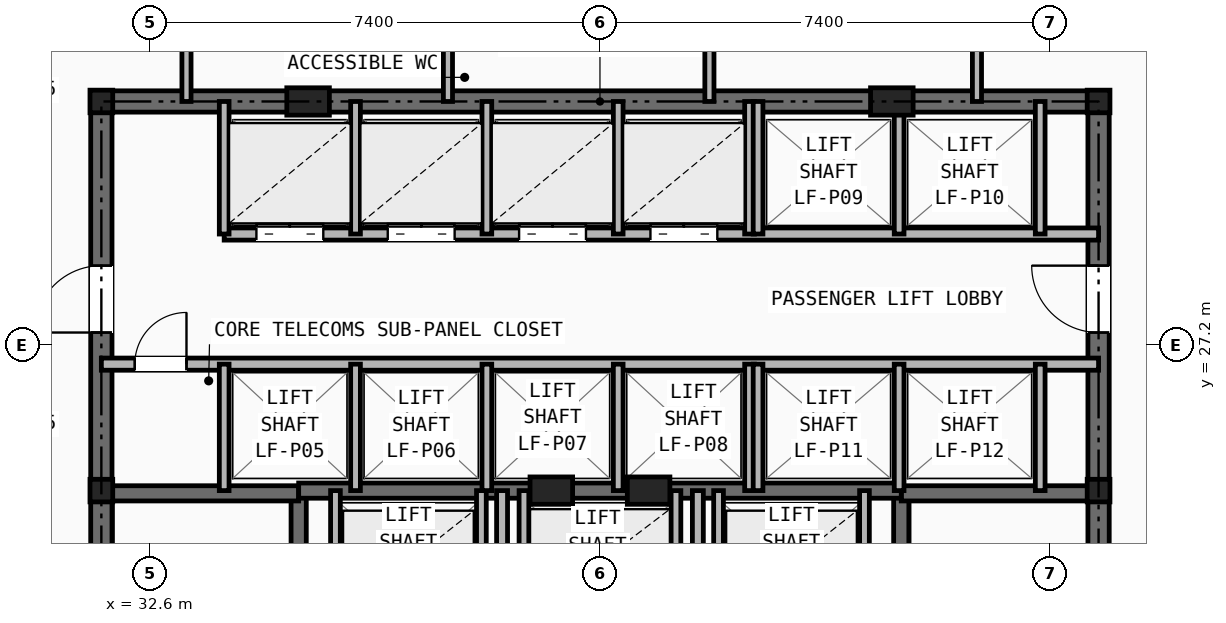
"""IFC4 building model, lengths in metres.
Left out: names, types, materials, properties, quantities, classifications, styles, units other than length and angle.
Written with IfcOpenShell. Run it as: python <this file> out.ifc"""

import sys

from ifc_helpers import new_model, si_unit, direction, frame, frame_2d, origin, origin_2d, place, context, subcontext, project, spatial, rectangle, i_section, extrude, element, fill, save


model = new_model("IFC4")
c1 = context("Model", 3, precision=1e-05, world=origin(), true_north=direction((0.0, 1.0)))
c2 = subcontext(c1, "Body", "Model", "MODEL_VIEW")
j1 = project(units=[si_unit("LENGTHUNIT", "METRE"), si_unit("PLANEANGLEUNIT", "RADIAN")], contexts=[c1])
p1 = place(None, origin())
s1 = spatial("IfcSite", under=j1, at=p1, CompositionType="ELEMENT")
p2 = place(p1, origin())
s2 = spatial("IfcBuilding", under=s1, at=p2, CompositionType="ELEMENT")
p3 = place(p2, frame((0.0, 0.0, 79.8)))
s3 = spatial("IfcBuildingStorey", under=s2, at=p3, CompositionType="ELEMENT", Elevation=79.8)
for number, where, z_axis, x_axis in (
    (1, (31.8, 24.8, 0.0), (0.0, 0.0, 1.0), (1.0, 0.0, 0.0)),
    (2, (48.2, 24.8, 0.0), (0.0, 0.0, 1.0), (1.0, 0.0, 0.0)),
    (3, (31.8, 31.2, 0.0), (0.0, 0.0, 1.0), (1.0, 0.0, 0.0)),
    (4, (48.2, 31.2, 0.0), (0.0, 0.0, 1.0), (1.0, 0.0, 0.0)),
):
    element("IfcColumn", number, at=place(p3, frame(where, z_axis=z_axis, x_axis=x_axis)), inside=s3, PredefinedType="COLUMN", context=c2, shape_type="SweptSolid", body=[
        extrude(i_section(OverallWidth=0.374, OverallDepth=0.372, WebThickness=0.016, FlangeThickness=0.026, at=origin_2d()), origin(), (0.0, 0.0, 1.0), 3.2),
    ])
for number, where, z_axis, x_axis in (
    (5, (35.2, 31.2, 0.0), (0.0, 0.0, 1.0), (1.0, 0.0, 0.0)),
    (6, (44.8, 31.2, 0.0), (0.0, 0.0, 1.0), (1.0, 0.0, 0.0)),
    (7, (39.2, 24.8, 0.0), (0.0, 0.0, 1.0), (1.0, 0.0, 0.0)),
    (8, (40.8, 24.8, 0.0), (0.0, 0.0, 1.0), (1.0, 0.0, 0.0)),
):
    element("IfcColumn", number, at=place(p3, frame(where, z_axis=z_axis, x_axis=x_axis)), inside=s3, PredefinedType="PILASTER", context=c2, shape_type="SweptSolid", body=[
        extrude(rectangle(XDim=0.7, YDim=0.45, at=origin_2d()), origin(), (0.0, 0.0, 1.0), 3.2),
    ])
p4 = place(p3, frame((31.8, 31.2, 0.0), z_axis=(0.0, 0.0, 1.0), x_axis=(1.0, 0.0, 0.0)))
e9 = element("IfcWall", 9, at=p4, inside=s3, PredefinedType="SHEAR", context=c2, shape_type="SweptSolid", body=[
    extrude(rectangle(XDim=16.4, YDim=0.35, at=frame_2d((8.2, 0.0))), origin(), (0.0, 0.0, 1.0), 2.97),
])
p5 = place(p3, frame((31.8, 16.4, 0.0), z_axis=(0.0, 0.0, 1.0), x_axis=(0.0, 1.0, 0.0)))
e10 = element("IfcWall", 10, at=p5, inside=s3, PredefinedType="SHEAR", context=c2, shape_type="SweptSolid", body=[
    extrude(rectangle(XDim=14.8, YDim=0.35, at=frame_2d((7.4, 0.0))), origin(), (0.0, 0.0, 1.0), 2.97),
])
p6 = place(p5, frame((11.0, 0.0, 0.0)))
e11 = element("IfcOpeningElement", 11, at=p6, cuts=e10, PredefinedType="OPENING", context=c2, shape_type="SweptSolid", body=[
    extrude(rectangle(XDim=1.1, YDim=2.15, at=frame_2d((0.55, 1.075))), frame((0.0, 0.185, 0.0), z_axis=(0.0, -1.0, 0.0), x_axis=(1.0, 0.0, 0.0)), (0.0, 0.0, 1.0), 0.37),
])
p7 = place(p3, frame((48.2, 16.4, 0.0), z_axis=(0.0, 0.0, 1.0), x_axis=(0.0, 1.0, 0.0)))
e12 = element("IfcWall", 12, at=p7, inside=s3, PredefinedType="SHEAR", context=c2, shape_type="SweptSolid", body=[
    extrude(rectangle(XDim=14.8, YDim=0.35, at=frame_2d((7.4, 0.0))), origin(), (0.0, 0.0, 1.0), 2.97),
])
p8 = place(p7, frame((11.0, 0.0, 0.0)))
e13 = element("IfcOpeningElement", 13, at=p8, cuts=e12, PredefinedType="OPENING", context=c2, shape_type="SweptSolid", body=[
    extrude(rectangle(XDim=1.1, YDim=2.15, at=frame_2d((0.55, 1.075))), frame((0.0, 0.185, 0.0), z_axis=(0.0, -1.0, 0.0), x_axis=(1.0, 0.0, 0.0)), (0.0, 0.0, 1.0), 0.37),
])
p9 = place(p3, frame((35.045, 16.4, 0.0), z_axis=(0.0, 0.0, 1.0), x_axis=(0.0, 1.0, 0.0)))
e14 = element("IfcWall", 14, at=p9, inside=s3, PredefinedType="SHEAR", context=c2, shape_type="SweptSolid", body=[
    extrude(rectangle(XDim=8.4, YDim=0.25, at=frame_2d((4.2, 0.0))), origin(), (0.0, 0.0, 1.0), 2.97),
])
p10 = place(p9, frame((0.45, 0.0, 0.0)))
e15 = element("IfcOpeningElement", 15, at=p10, cuts=e14, PredefinedType="OPENING", context=c2, shape_type="SweptSolid", body=[
    extrude(rectangle(XDim=0.95, YDim=2.1, at=frame_2d((0.475, 1.05))), frame((0.0, 0.135, 0.0), z_axis=(0.0, -1.0, 0.0), x_axis=(1.0, 0.0, 0.0)), (0.0, 0.0, 1.0), 0.27),
])
p11 = place(p3, frame((31.8, 24.755, 0.0), z_axis=(0.0, 0.0, 1.0), x_axis=(1.0, 0.0, 0.0)))
e16 = element("IfcWall", 16, at=p11, inside=s3, PredefinedType="SHEAR", context=c2, shape_type="SweptSolid", body=[
    extrude(rectangle(XDim=3.245, YDim=0.25, at=frame_2d((1.623, 0.0))), origin(), (0.0, 0.0, 1.0), 2.97),
])
p12 = place(p3, frame((44.955, 16.4, 0.0), z_axis=(0.0, 0.0, 1.0), x_axis=(0.0, 1.0, 0.0)))
e17 = element("IfcWall", 17, at=p12, inside=s3, PredefinedType="SHEAR", context=c2, shape_type="SweptSolid", body=[
    extrude(rectangle(XDim=8.4, YDim=0.25, at=frame_2d((4.2, 0.0))), origin(), (0.0, 0.0, 1.0), 2.97),
])
p13 = place(p12, frame((0.45, 0.0, 0.0)))
e18 = element("IfcOpeningElement", 18, at=p13, cuts=e17, PredefinedType="OPENING", context=c2, shape_type="SweptSolid", body=[
    extrude(rectangle(XDim=0.95, YDim=2.1, at=frame_2d((0.475, 1.05))), frame((0.0, 0.135, 0.0), z_axis=(0.0, -1.0, 0.0), x_axis=(1.0, 0.0, 0.0)), (0.0, 0.0, 1.0), 0.27),
])
p14 = place(p3, frame((44.955, 24.755, 0.0), z_axis=(0.0, 0.0, 1.0), x_axis=(1.0, 0.0, 0.0)))
e19 = element("IfcWall", 19, at=p14, inside=s3, PredefinedType="SHEAR", context=c2, shape_type="SweptSolid", body=[
    extrude(rectangle(XDim=3.245, YDim=0.25, at=frame_2d((1.623, 0.0))), origin(), (0.0, 0.0, 1.0), 2.97),
])
p15 = place(p3, frame((35.045, 24.8, 0.0), z_axis=(0.0, 0.0, 1.0), x_axis=(1.0, 0.0, 0.0)))
e20 = element("IfcWall", 20, at=p15, inside=s3, PredefinedType="SHEAR", context=c2, shape_type="SweptSolid", body=[
    extrude(rectangle(XDim=9.91, YDim=0.25, at=frame_2d((4.955, 0.0))), origin(), (0.0, 0.0, 1.0), 2.97),
])
p16 = place(p3, frame((38.39, 16.4, 0.0), z_axis=(0.0, 0.0, 1.0), x_axis=(0.0, 1.0, 0.0)))
e21 = element("IfcWall", 21, at=p16, inside=s3, PredefinedType="PARTITIONING", context=c2, shape_type="SweptSolid", body=[
    extrude(rectangle(XDim=8.4, YDim=0.18, at=frame_2d((4.2, 0.0))), origin(), (0.0, 0.0, 1.0), 2.421),
])
p17 = place(p16, frame((3.85, 0.0, 0.0)))
e22 = element("IfcOpeningElement", 22, at=p17, cuts=e21, PredefinedType="OPENING", context=c2, shape_type="SweptSolid", body=[
    extrude(rectangle(XDim=0.95, YDim=2.1, at=frame_2d((0.475, 1.05))), frame((0.0, 0.1, 0.0), z_axis=(0.0, -1.0, 0.0), x_axis=(1.0, 0.0, 0.0)), (0.0, 0.0, 1.0), 0.2),
])
p18 = place(p3, frame((41.61, 16.4, 0.0), z_axis=(0.0, 0.0, 1.0), x_axis=(0.0, 1.0, 0.0)))
e23 = element("IfcWall", 23, at=p18, inside=s3, PredefinedType="PARTITIONING", context=c2, shape_type="SweptSolid", body=[
    extrude(rectangle(XDim=8.4, YDim=0.18, at=frame_2d((4.2, 0.0))), origin(), (0.0, 0.0, 1.0), 2.421),
])
for number, where, z_axis, x_axis in (
    (24, (35.65, 22.48, 0.0), (0.0, 0.0, 1.0), (0.0, 1.0, 0.0)),
    (25, (38.05, 22.48, 0.0), (0.0, 0.0, 1.0), (0.0, 1.0, 0.0)),
    (26, (41.95, 22.48, 0.0), (0.0, 0.0, 1.0), (0.0, 1.0, 0.0)),
    (27, (44.35, 22.48, 0.0), (0.0, 0.0, 1.0), (0.0, 1.0, 0.0)),
    (28, (38.75, 22.48, 0.0), (0.0, 0.0, 1.0), (0.0, 1.0, 0.0)),
    (29, (41.25, 22.48, 0.0), (0.0, 0.0, 1.0), (0.0, 1.0, 0.0)),
):
    element("IfcWall", number, at=place(p3, frame(where, z_axis=z_axis, x_axis=x_axis)), inside=s3, PredefinedType="SOLIDWALL", context=c2, shape_type="SweptSolid", body=[
        extrude(rectangle(XDim=2.32, YDim=0.16, at=frame_2d((1.16, 0.0))), origin(), (0.0, 0.0, 1.0), 2.97),
    ])
p19 = place(p3, frame((33.82, 29.02, 0.0), z_axis=(0.0, 0.0, 1.0), x_axis=(1.0, 0.0, 0.0)))
e30 = element("IfcWall", 30, at=p19, inside=s3, PredefinedType="SOLIDWALL", context=c2, shape_type="SweptSolid", body=[
    extrude(rectangle(XDim=14.38, YDim=0.2, at=frame_2d((7.19, 0.0))), origin(), (0.0, 0.0, 1.0), 2.421),
])
p20 = place(p19, frame((0.53, 0.0, 0.0)))
e31 = element("IfcOpeningElement", 31, at=p20, cuts=e30, PredefinedType="OPENING", context=c2, shape_type="SweptSolid", body=[
    extrude(rectangle(XDim=1.1, YDim=2.15, at=frame_2d((0.55, 1.075))), frame((0.0, 0.11, 0.0), z_axis=(0.0, -1.0, 0.0), x_axis=(1.0, 0.0, 0.0)), (0.0, 0.0, 1.0), 0.22),
])
p21 = place(p19, frame((2.69, 0.0, 0.0)))
e32 = element("IfcOpeningElement", 32, at=p21, cuts=e30, PredefinedType="OPENING", context=c2, shape_type="SweptSolid", body=[
    extrude(rectangle(XDim=1.1, YDim=2.15, at=frame_2d((0.55, 1.075))), frame((0.0, 0.11, 0.0), z_axis=(0.0, -1.0, 0.0), x_axis=(1.0, 0.0, 0.0)), (0.0, 0.0, 1.0), 0.22),
])
p22 = place(p19, frame((4.85, 0.0, 0.0)))
e33 = element("IfcOpeningElement", 33, at=p22, cuts=e30, PredefinedType="OPENING", context=c2, shape_type="SweptSolid", body=[
    extrude(rectangle(XDim=1.1, YDim=2.15, at=frame_2d((0.55, 1.075))), frame((0.0, 0.11, 0.0), z_axis=(0.0, -1.0, 0.0), x_axis=(1.0, 0.0, 0.0)), (0.0, 0.0, 1.0), 0.22),
])
p23 = place(p19, frame((7.01, 0.0, 0.0)))
e34 = element("IfcOpeningElement", 34, at=p23, cuts=e30, PredefinedType="OPENING", context=c2, shape_type="SweptSolid", body=[
    extrude(rectangle(XDim=1.1, YDim=2.15, at=frame_2d((0.55, 1.075))), frame((0.0, 0.11, 0.0), z_axis=(0.0, -1.0, 0.0), x_axis=(1.0, 0.0, 0.0)), (0.0, 0.0, 1.0), 0.22),
])
p24 = place(p3, frame((31.8, 26.88, 0.0), z_axis=(0.0, 0.0, 1.0), x_axis=(1.0, 0.0, 0.0)))
e35 = element("IfcWall", 35, at=p24, inside=s3, PredefinedType="SOLIDWALL", context=c2, shape_type="SweptSolid", body=[
    extrude(rectangle(XDim=16.4, YDim=0.2, at=frame_2d((8.2, 0.0))), origin(), (0.0, 0.0, 1.0), 2.421),
])
p25 = place(p24, frame((0.55, 0.0, 0.0)))
e36 = element("IfcOpeningElement", 36, at=p25, cuts=e35, PredefinedType="OPENING", context=c2, shape_type="SweptSolid", body=[
    extrude(rectangle(XDim=0.85, YDim=2.05, at=frame_2d((0.425, 1.025))), frame((0.0, 0.11, 0.0), z_axis=(0.0, -1.0, 0.0), x_axis=(1.0, 0.0, 0.0)), (0.0, 0.0, 1.0), 0.22),
])
p26 = place(p3, frame((33.82, 29.02, 0.0), z_axis=(0.0, 0.0, 1.0), x_axis=(0.0, 1.0, 0.0)))
e37 = element("IfcWall", 37, at=p26, inside=s3, PredefinedType="SOLIDWALL", context=c2, shape_type="SweptSolid", body=[
    extrude(rectangle(XDim=2.18, YDim=0.16, at=frame_2d((1.09, 0.0))), origin(), (0.0, 0.0, 1.0), 2.421),
])
p27 = place(p3, frame((33.82, 24.8, 0.0), z_axis=(0.0, 0.0, 1.0), x_axis=(0.0, 1.0, 0.0)))
e38 = element("IfcWall", 38, at=p27, inside=s3, PredefinedType="SOLIDWALL", context=c2, shape_type="SweptSolid", body=[
    extrude(rectangle(XDim=2.08, YDim=0.16, at=frame_2d((1.04, 0.0))), origin(), (0.0, 0.0, 1.0), 2.97),
])
for number, where, z_axis, x_axis in (
    (39, (35.98, 29.02, 0.0), (0.0, 0.0, 1.0), (0.0, 1.0, 0.0)),
    (40, (38.14, 29.02, 0.0), (0.0, 0.0, 1.0), (0.0, 1.0, 0.0)),
    (41, (40.3, 29.02, 0.0), (0.0, 0.0, 1.0), (0.0, 1.0, 0.0)),
    (42, (42.46, 29.02, 0.0), (0.0, 0.0, 1.0), (0.0, 1.0, 0.0)),
):
    element("IfcWall", number, at=place(p3, frame(where, z_axis=z_axis, x_axis=x_axis)), inside=s3, PredefinedType="SOLIDWALL", context=c2, shape_type="SweptSolid", body=[
        extrude(rectangle(XDim=2.18, YDim=0.16, at=frame_2d((1.09, 0.0))), origin(), (0.0, 0.0, 1.0), 2.421),
    ])
for number, where, z_axis, x_axis in (
    (43, (35.98, 24.8, 0.0), (0.0, 0.0, 1.0), (0.0, 1.0, 0.0)),
    (44, (38.14, 24.8, 0.0), (0.0, 0.0, 1.0), (0.0, 1.0, 0.0)),
    (45, (40.3, 24.8, 0.0), (0.0, 0.0, 1.0), (0.0, 1.0, 0.0)),
    (46, (42.46, 24.8, 0.0), (0.0, 0.0, 1.0), (0.0, 1.0, 0.0)),
):
    element("IfcWall", number, at=place(p3, frame(where, z_axis=z_axis, x_axis=x_axis)), inside=s3, PredefinedType="SOLIDWALL", context=c2, shape_type="SweptSolid", body=[
        extrude(rectangle(XDim=2.08, YDim=0.16, at=frame_2d((1.04, 0.0))), origin(), (0.0, 0.0, 1.0), 2.97),
    ])
for number, where, z_axis, x_axis in (
    (47, (42.6, 29.02, 0.0), (0.0, 0.0, 1.0), (0.0, 1.0, 0.0)),
    (48, (44.92, 29.02, 0.0), (0.0, 0.0, 1.0), (0.0, 1.0, 0.0)),
    (49, (47.24, 29.02, 0.0), (0.0, 0.0, 1.0), (0.0, 1.0, 0.0)),
):
    element("IfcWall", number, at=place(p3, frame(where, z_axis=z_axis, x_axis=x_axis)), inside=s3, PredefinedType="SOLIDWALL", context=c2, shape_type="SweptSolid", body=[
        extrude(rectangle(XDim=2.18, YDim=0.16, at=frame_2d((1.09, 0.0))), origin(), (0.0, 0.0, 1.0), 2.421),
    ])
for number, where, z_axis, x_axis in (
    (50, (42.6, 24.8, 0.0), (0.0, 0.0, 1.0), (0.0, 1.0, 0.0)),
    (51, (44.92, 24.8, 0.0), (0.0, 0.0, 1.0), (0.0, 1.0, 0.0)),
    (52, (47.24, 24.8, 0.0), (0.0, 0.0, 1.0), (0.0, 1.0, 0.0)),
):
    element("IfcWall", number, at=place(p3, frame(where, z_axis=z_axis, x_axis=x_axis)), inside=s3, PredefinedType="SOLIDWALL", context=c2, shape_type="SweptSolid", body=[
        extrude(rectangle(XDim=2.08, YDim=0.16, at=frame_2d((1.04, 0.0))), origin(), (0.0, 0.0, 1.0), 2.97),
    ])
for number, where, z_axis, x_axis in (
    (53, (33.2, 31.2, 0.0), (0.0, 0.0, 1.0), (0.0, 1.0, 0.0)),
    (54, (46.2, 31.2, 0.0), (0.0, 0.0, 1.0), (0.0, 1.0, 0.0)),
    (55, (37.5, 31.2, 0.0), (0.0, 0.0, 1.0), (0.0, 1.0, 0.0)),
    (56, (41.8, 31.2, 0.0), (0.0, 0.0, 1.0), (0.0, 1.0, 0.0)),
):
    element("IfcWall", number, at=place(p3, frame(where, z_axis=z_axis, x_axis=x_axis)), inside=s3, PredefinedType="PARTITIONING", context=c2, shape_type="SweptSolid", body=[
        extrude(rectangle(XDim=2.6, YDim=0.15, at=frame_2d((1.3, 0.0))), origin(), (0.0, 0.0, 1.0), 2.421),
    ])
p28 = place(p25, origin())
e57 = element("IfcDoor", 57, at=p28, inside=s3, OperationType="SINGLE_SWING_RIGHT", PredefinedType="DOOR", context=c2, shape_type="SweptSolid", body=[
    extrude(rectangle(XDim=0.85, YDim=2.05, at=frame_2d((0.425, 1.025))), frame((0.0, 0.025, 0.0), z_axis=(0.0, -1.0, 0.0), x_axis=(1.0, 0.0, 0.0)), (0.0, 0.0, 1.0), 0.05),
])
fill(e36, e57)
p29 = place(p6, origin())
e58 = element("IfcDoor", 58, at=p29, inside=s3, OperationType="SINGLE_SWING_LEFT", PredefinedType="DOOR", context=c2, shape_type="SweptSolid", body=[
    extrude(rectangle(XDim=1.1, YDim=2.15, at=frame_2d((0.55, 1.075))), frame((0.0, 0.025, 0.0), z_axis=(0.0, -1.0, 0.0), x_axis=(1.0, 0.0, 0.0)), (0.0, 0.0, 1.0), 0.05),
])
fill(e11, e58)
p30 = place(p8, origin())
e59 = element("IfcDoor", 59, at=p30, inside=s3, OperationType="SINGLE_SWING_RIGHT", PredefinedType="DOOR", context=c2, shape_type="SweptSolid", body=[
    extrude(rectangle(XDim=1.1, YDim=2.15, at=frame_2d((0.55, 1.075))), frame((0.0, 0.025, 0.0), z_axis=(0.0, -1.0, 0.0), x_axis=(1.0, 0.0, 0.0)), (0.0, 0.0, 1.0), 0.05),
])
fill(e13, e59)
p31 = place(p20, origin())
e60 = element("IfcDoor", 60, at=p31, inside=s3, OperationType="DOUBLE_DOOR_SLIDING", PredefinedType="DOOR", context=c2, shape_type="SweptSolid", body=[
    extrude(rectangle(XDim=1.1, YDim=2.15, at=frame_2d((0.55, 1.075))), frame((0.0, 0.025, 0.0), z_axis=(0.0, -1.0, 0.0), x_axis=(1.0, 0.0, 0.0)), (0.0, 0.0, 1.0), 0.05),
])
fill(e31, e60)
p32 = place(p21, origin())
e61 = element("IfcDoor", 61, at=p32, inside=s3, OperationType="DOUBLE_DOOR_SLIDING", PredefinedType="DOOR", context=c2, shape_type="SweptSolid", body=[
    extrude(rectangle(XDim=1.1, YDim=2.15, at=frame_2d((0.55, 1.075))), frame((0.0, 0.025, 0.0), z_axis=(0.0, -1.0, 0.0), x_axis=(1.0, 0.0, 0.0)), (0.0, 0.0, 1.0), 0.05),
])
fill(e32, e61)
p33 = place(p22, origin())
e62 = element("IfcDoor", 62, at=p33, inside=s3, OperationType="DOUBLE_DOOR_SLIDING", PredefinedType="DOOR", context=c2, shape_type="SweptSolid", body=[
    extrude(rectangle(XDim=1.1, YDim=2.15, at=frame_2d((0.55, 1.075))), frame((0.0, 0.025, 0.0), z_axis=(0.0, -1.0, 0.0), x_axis=(1.0, 0.0, 0.0)), (0.0, 0.0, 1.0), 0.05),
])
fill(e33, e62)
p34 = place(p23, origin())
e63 = element("IfcDoor", 63, at=p34, inside=s3, OperationType="DOUBLE_DOOR_SLIDING", PredefinedType="DOOR", context=c2, shape_type="SweptSolid", body=[
    extrude(rectangle(XDim=1.1, YDim=2.15, at=frame_2d((0.55, 1.075))), frame((0.0, 0.025, 0.0), z_axis=(0.0, -1.0, 0.0), x_axis=(1.0, 0.0, 0.0)), (0.0, 0.0, 1.0), 0.05),
])
fill(e34, e63)
save(model, sys.argv[1])
